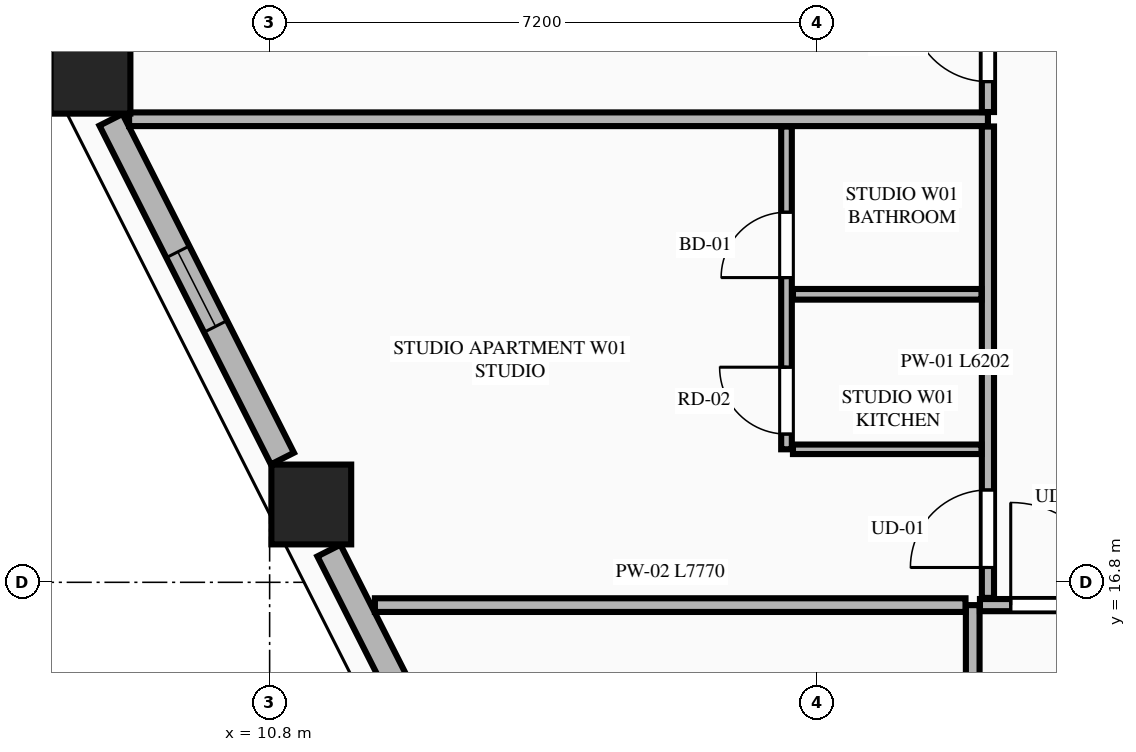
"""IFC4 building model, lengths in metres.
Left out: names, types, materials, properties, quantities, classifications, styles, units other than length and angle.
Written with IfcOpenShell. Run it as: python <this file> out.ifc"""

import sys

from ifc_helpers import new_model, si_unit, direction, frame, frame_2d, origin, origin_2d, place, context, subcontext, project, spatial, rectangle, extrude, element, fill, save


model = new_model("IFC4")
c1 = context("Model", 3, precision=1e-05, world=origin(), true_north=direction((0.0, 1.0)))
c2 = subcontext(c1, "Body", "Model", "MODEL_VIEW")
j1 = project(units=[si_unit("LENGTHUNIT", "METRE"), si_unit("PLANEANGLEUNIT", "RADIAN")], contexts=[c1])
p1 = place(None, origin())
s1 = spatial("IfcSite", under=j1, at=p1, CompositionType="ELEMENT")
p2 = place(p1, origin())
s2 = spatial("IfcBuilding", under=s1, at=p2, CompositionType="ELEMENT")
p3 = place(p2, frame((0.0, 0.0, 119.7)))
s3 = spatial("IfcBuildingStorey", under=s2, at=p3, CompositionType="ELEMENT", Elevation=119.7)
for number, where, z_axis, x_axis in (
    (1, (8.443, 23.491, 0.0), (0.0, 0.0, 1.0), (1.0, 0.0, 0.0)),
    (2, (11.348, 17.824, 0.0), (0.0, 0.0, 1.0), (1.0, 0.0, 0.0)),
):
    element("IfcColumn", number, at=place(p3, frame(where, z_axis=z_axis, x_axis=x_axis)), inside=s3, PredefinedType="COLUMN", context=c2, shape_type="SweptSolid", body=[
        extrude(rectangle(XDim=1.05, YDim=1.05, at=origin_2d()), origin(), (0.0, 0.0, 1.0), 3.55),
    ])
p4 = place(p3, frame((8.713, 22.885, 0.0), z_axis=(0.0, 0.0, 1.0), x_axis=(0.451470533039, -0.892286029139, 0.0)))
e3 = element("IfcWall", 3, at=p4, inside=s3, PredefinedType="STANDARD", context=c2, shape_type="SweptSolid", body=[
    extrude(rectangle(XDim=4.995, YDim=0.34, at=frame_2d((2.498, 0.0))), origin(), (0.0, 0.0, 1.0), 2.797),
])
p5 = place(p4, frame((1.947, 0.0, 0.75)))
e4 = element("IfcOpeningElement", 4, at=p5, cuts=e3, PredefinedType="OPENING", context=c2, shape_type="SweptSolid", body=[
    extrude(rectangle(XDim=1.1, YDim=1.897, at=frame_2d((0.55, 0.948))), frame((0.0, 0.18, 0.0), z_axis=(0.0, -1.0, 0.0), x_axis=(1.0, 0.0, 0.0)), (0.0, 0.0, 1.0), 0.36),
])
p6 = place(p3, frame((11.58, 17.218, 0.0), z_axis=(0.0, 0.0, 1.0), x_axis=(0.451567731634, -0.892236842855, 0.0)))
e5 = element("IfcWall", 5, at=p6, inside=s3, PredefinedType="STANDARD", context=c2, shape_type="SweptSolid", body=[
    extrude(rectangle(XDim=5.219, YDim=0.34, at=frame_2d((2.61, 0.0))), origin(), (0.0, 0.0, 1.0), 2.797),
])
p7 = place(p6, frame((2.06, 0.0, 0.75)))
e6 = element("IfcOpeningElement", 6, at=p7, cuts=e5, PredefinedType="OPENING", context=c2, shape_type="SweptSolid", body=[
    extrude(rectangle(XDim=1.1, YDim=1.897, at=frame_2d((0.55, 0.948))), frame((0.0, 0.18, 0.0), z_axis=(0.0, -1.0, 0.0), x_axis=(1.0, 0.0, 0.0)), (0.0, 0.0, 1.0), 0.36),
])
p8 = place(p3, frame((20.05, 4.105, 0.0), z_axis=(0.0, 0.0, 1.0), x_axis=(0.0, 1.0, 0.0)))
e7 = element("IfcWall", 7, at=p8, inside=s3, PredefinedType="PARTITIONING", context=c2, shape_type="SweptSolid", body=[
    extrude(rectangle(XDim=12.395, YDim=0.18, at=frame_2d((6.198, 0.0))), origin(), (0.0, 0.0, 1.0), 3.34),
])
p9 = place(p3, frame((20.145, 16.5, 0.0), z_axis=(0.0, 0.0, 1.0), x_axis=(1.0, 0.0, 0.0)))
e8 = element("IfcWall", 8, at=p9, inside=s3, PredefinedType="PARTITIONING", context=c2, shape_type="SweptSolid", body=[
    extrude(rectangle(XDim=24.51, YDim=0.16, at=frame_2d((12.255, 0.0))), origin(), (0.0, 0.0, 1.0), 3.34),
])
p10 = place(p9, frame((0.405, 0.0, 0.0)))
e9 = element("IfcOpeningElement", 9, at=p10, cuts=e8, PredefinedType="OPENING", context=c2, shape_type="SweptSolid", body=[
    extrude(rectangle(XDim=1.35, YDim=2.35, at=frame_2d((0.675, 1.175))), frame((0.0, 0.09, 0.0), z_axis=(0.0, -1.0, 0.0), x_axis=(1.0, 0.0, 0.0)), (0.0, 0.0, 1.0), 0.18),
])
p11 = place(p3, frame((12.185, 16.5, 0.0), z_axis=(0.0, 0.0, 1.0), x_axis=(1.0, 0.0, 0.0)))
e10 = element("IfcWall", 10, at=p11, inside=s3, PredefinedType="PARTITIONING", context=c2, shape_type="SweptSolid", body=[
    extrude(rectangle(XDim=7.77, YDim=0.18, at=frame_2d((3.885, 0.0))), origin(), (0.0, 0.0, 1.0), 3.34),
])
p12 = place(p3, frame((20.25, 16.595, 0.0), z_axis=(0.0, 0.0, 1.0), x_axis=(0.0, 1.0, 0.0)))
e11 = element("IfcWall", 11, at=p12, inside=s3, PredefinedType="PARTITIONING", context=c2, shape_type="SweptSolid", body=[
    extrude(rectangle(XDim=6.202, YDim=0.16, at=frame_2d((3.101, 0.0))), origin(), (0.0, 0.0, 1.0), 3.34),
])
p13 = place(p12, frame((0.4, 0.0, 0.0)))
e12 = element("IfcOpeningElement", 12, at=p13, cuts=e11, PredefinedType="OPENING", context=c2, shape_type="SweptSolid", body=[
    extrude(rectangle(XDim=1.02, YDim=2.25, at=frame_2d((0.51, 1.125))), frame((0.0, 0.09, 0.0), z_axis=(0.0, -1.0, 0.0), x_axis=(1.0, 0.0, 0.0)), (0.0, 0.0, 1.0), 0.18),
])
p14 = place(p3, frame((17.685, 18.55, 0.0), z_axis=(0.0, 0.0, 1.0), x_axis=(1.0, 0.0, 0.0)))
e13 = element("IfcWall", 13, at=p14, inside=s3, PredefinedType="PARTITIONING", context=c2, shape_type="SweptSolid", body=[
    extrude(rectangle(XDim=2.48, YDim=0.125, at=frame_2d((1.24, 0.0))), origin(), (0.0, 0.0, 1.0), 2.722),
])
p15 = place(p3, frame((17.6, 18.55, 0.0), z_axis=(0.0, 0.0, 1.0), x_axis=(0.0, 1.0, 0.0)))
e14 = element("IfcWall", 14, at=p15, inside=s3, PredefinedType="PLUMBINGWALL", context=c2, shape_type="SweptSolid", body=[
    extrude(rectangle(XDim=4.247, YDim=0.14, at=frame_2d((2.124, 0.0))), origin(), (0.0, 0.0, 1.0), 3.34),
])
p16 = place(p15, frame((2.259, 0.0, 0.0)))
e15 = element("IfcOpeningElement", 15, at=p16, cuts=e14, PredefinedType="OPENING", context=c2, shape_type="SweptSolid", body=[
    extrude(rectangle(XDim=0.86, YDim=2.1, at=frame_2d((0.43, 1.05))), frame((0.0, 0.08, 0.0), z_axis=(0.0, -1.0, 0.0), x_axis=(1.0, 0.0, 0.0)), (0.0, 0.0, 1.0), 0.16),
])
p17 = place(p15, frame((0.2, 0.0, 0.0)))
e16 = element("IfcOpeningElement", 16, at=p17, cuts=e14, PredefinedType="OPENING", context=c2, shape_type="SweptSolid", body=[
    extrude(rectangle(XDim=0.88, YDim=2.15, at=frame_2d((0.44, 1.075))), frame((0.0, 0.08, 0.0), z_axis=(0.0, -1.0, 0.0), x_axis=(1.0, 0.0, 0.0)), (0.0, 0.0, 1.0), 0.16),
])
p18 = place(p3, frame((17.685, 20.589, 0.0), z_axis=(0.0, 0.0, 1.0), x_axis=(1.0, 0.0, 0.0)))
e17 = element("IfcWall", 17, at=p18, inside=s3, PredefinedType="PLUMBINGWALL", context=c2, shape_type="SweptSolid", body=[
    extrude(rectangle(XDim=2.48, YDim=0.14, at=frame_2d((1.24, 0.0))), origin(), (0.0, 0.0, 1.0), 3.34),
])
p19 = place(p3, frame((8.951, 22.892, 0.0), z_axis=(0.0, 0.0, 1.0), x_axis=(1.0, 0.0, 0.0)))
e18 = element("IfcWall", 18, at=p19, inside=s3, PredefinedType="PARTITIONING", context=c2, shape_type="SweptSolid", body=[
    extrude(rectangle(XDim=11.299, YDim=0.18, at=frame_2d((5.649, 0.0))), origin(), (0.0, 0.0, 1.0), 3.34),
])
p20 = place(p3, frame((20.25, 22.987, 0.0), z_axis=(0.0, 0.0, 1.0), x_axis=(0.0, 1.0, 0.0)))
e19 = element("IfcWall", 19, at=p20, inside=s3, PredefinedType="PARTITIONING", context=c2, shape_type="SweptSolid", body=[
    extrude(rectangle(XDim=6.014, YDim=0.16, at=frame_2d((3.007, 0.0))), origin(), (0.0, 0.0, 1.0), 3.34),
])
p21 = place(p20, frame((0.4, 0.0, 0.0)))
e20 = element("IfcOpeningElement", 20, at=p21, cuts=e19, PredefinedType="OPENING", context=c2, shape_type="SweptSolid", body=[
    extrude(rectangle(XDim=1.02, YDim=2.25, at=frame_2d((0.51, 1.125))), frame((0.0, 0.09, 0.0), z_axis=(0.0, -1.0, 0.0), x_axis=(1.0, 0.0, 0.0)), (0.0, 0.0, 1.0), 0.18),
])
p22 = place(p5, origin())
e21 = element("IfcWindow", 21, at=p22, inside=s3, PartitioningType="SINGLE_PANEL", PredefinedType="WINDOW", context=c2, shape_type="SweptSolid", body=[
    extrude(rectangle(XDim=1.1, YDim=1.897, at=frame_2d((0.55, 0.948))), frame((0.0, 0.03, 0.0), z_axis=(0.0, -1.0, 0.0), x_axis=(1.0, 0.0, 0.0)), (0.0, 0.0, 1.0), 0.06),
])
fill(e4, e21)
p23 = place(p10, origin())
e22 = element("IfcDoor", 22, at=p23, inside=s3, OperationType="SINGLE_SWING_LEFT", PredefinedType="DOOR", context=c2, shape_type="SweptSolid", body=[
    extrude(rectangle(XDim=1.35, YDim=2.35, at=frame_2d((0.675, 1.175))), frame((0.0, 0.025, 0.0), z_axis=(0.0, -1.0, 0.0), x_axis=(1.0, 0.0, 0.0)), (0.0, 0.0, 1.0), 0.05),
])
fill(e9, e22)
p24 = place(p16, origin())
e23 = element("IfcDoor", 23, at=p24, inside=s3, OperationType="SINGLE_SWING_LEFT", PredefinedType="DOOR", context=c2, shape_type="SweptSolid", body=[
    extrude(rectangle(XDim=0.86, YDim=2.1, at=frame_2d((0.43, 1.05))), frame((0.0, 0.025, 0.0), z_axis=(0.0, -1.0, 0.0), x_axis=(1.0, 0.0, 0.0)), (0.0, 0.0, 1.0), 0.05),
])
fill(e15, e23)
p25 = place(p13, origin())
e24 = element("IfcDoor", 24, at=p25, inside=s3, OperationType="SINGLE_SWING_LEFT", PredefinedType="DOOR", context=c2, shape_type="SweptSolid", body=[
    extrude(rectangle(XDim=1.02, YDim=2.25, at=frame_2d((0.51, 1.125))), frame((0.0, 0.025, 0.0), z_axis=(0.0, -1.0, 0.0), x_axis=(1.0, 0.0, 0.0)), (0.0, 0.0, 1.0), 0.05),
])
fill(e12, e24)
p26 = place(p17, origin())
e25 = element("IfcDoor", 25, at=p26, inside=s3, OperationType="SINGLE_SWING_RIGHT", PredefinedType="DOOR", context=c2, shape_type="SweptSolid", body=[
    extrude(rectangle(XDim=0.88, YDim=2.15, at=frame_2d((0.44, 1.075))), frame((0.0, 0.025, 0.0), z_axis=(0.0, -1.0, 0.0), x_axis=(1.0, 0.0, 0.0)), (0.0, 0.0, 1.0), 0.05),
])
fill(e16, e25)
p27 = place(p21, origin())
e26 = element("IfcDoor", 26, at=p27, inside=s3, OperationType="SINGLE_SWING_RIGHT", PredefinedType="DOOR", context=c2, shape_type="SweptSolid", body=[
    extrude(rectangle(XDim=1.02, YDim=2.25, at=frame_2d((0.51, 1.125))), frame((0.0, 0.025, 0.0), z_axis=(0.0, -1.0, 0.0), x_axis=(1.0, 0.0, 0.0)), (0.0, 0.0, 1.0), 0.05),
])
fill(e20, e26)
save(model, sys.argv[1])
